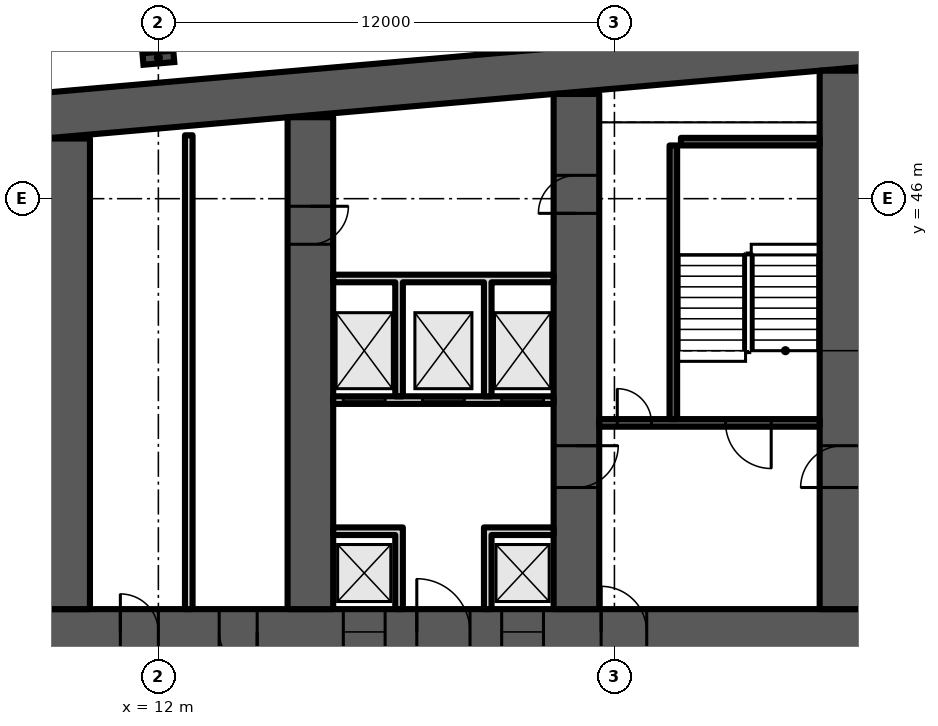
"""IFC4 building model, lengths in metres.
Left out: names, types, materials, properties, quantities, classifications, styles, units other than length and angle.
Written with IfcOpenShell. Run it as: python <this file> out.ifc"""

import sys

from ifc_helpers import new_model, si_unit, direction, frame, frame_2d, origin, origin_2d, place, context, subcontext, project, spatial, polyline, rectangle, i_section, outline, extrude, element, fill, save


model = new_model("IFC4")
c1 = context("Model", 3, precision=1e-05, world=origin(), true_north=direction((0.0, 1.0)))
c2 = subcontext(c1, "Body", "Model", "MODEL_VIEW")
j1 = project(units=[si_unit("LENGTHUNIT", "METRE"), si_unit("PLANEANGLEUNIT", "RADIAN")], contexts=[c1])
p1 = place(None, origin())
s1 = spatial("IfcSite", under=j1, at=p1, CompositionType="ELEMENT")
p2 = place(p1, origin())
s2 = spatial("IfcBuilding", under=s1, at=p2, CompositionType="ELEMENT")
p3 = place(p2, frame((0.0, 0.0, 52.3)))
s3 = spatial("IfcBuildingStorey", under=s2, at=p3, CompositionType="ELEMENT", Elevation=52.3)
p4 = place(p3, frame((0.0, 0.0, -0.0)))
e1 = element("IfcWall", 1, at=p4, inside=s3, PredefinedType="SHEAR", context=c2, shape_type="SweptSolid", body=[
    extrude(outline(polyline([(9.0, 47.583), (37.0, 50.032), (65.0, 47.583), (65.0, 48.787), (37.0, 51.237), (9.0, 48.787), (9.0, 47.583)])), origin(), (0.0, 0.0, 1.0), 3.6),
])
p5 = place(p3, frame((9.0, 34.6, 0.0), z_axis=(0.0, 0.0, 1.0), x_axis=(1.0, 0.0, 0.0)))
e2 = element("IfcWall", 2, at=p5, inside=s3, PredefinedType="SHEAR", context=c2, shape_type="SweptSolid", body=[
    extrude(rectangle(XDim=56.0, YDim=1.2, at=frame_2d((28.0, 0.0))), origin(), (0.0, 0.0, 1.0), 3.6),
])
p6 = place(p5, frame((2.0, 0.0, 0.0)))
e3 = element("IfcOpeningElement", 3, at=p6, cuts=e2, PredefinedType="OPENING", context=c2, shape_type="SweptSolid", body=[
    extrude(rectangle(XDim=1.0, YDim=2.1, at=frame_2d((0.5, 1.05))), frame((0.0, 0.61, 0.0), z_axis=(0.0, -1.0, 0.0), x_axis=(1.0, 0.0, 0.0)), (0.0, 0.0, 1.0), 1.22),
])
p7 = place(p5, frame((4.6, 0.0, 0.0)))
e4 = element("IfcOpeningElement", 4, at=p7, cuts=e2, PredefinedType="OPENING", context=c2, shape_type="SweptSolid", body=[
    extrude(rectangle(XDim=1.0, YDim=2.1, at=frame_2d((0.5, 1.05))), frame((0.0, 0.61, 0.0), z_axis=(0.0, -1.0, 0.0), x_axis=(1.0, 0.0, 0.0)), (0.0, 0.0, 1.0), 1.22),
])
p8 = place(p5, frame((7.867, 0.0, 0.0)))
e5 = element("IfcOpeningElement", 5, at=p8, cuts=e2, PredefinedType="OPENING", context=c2, shape_type="SweptSolid", body=[
    extrude(rectangle(XDim=1.1, YDim=2.1, at=frame_2d((0.55, 1.05))), frame((0.0, 0.61, 0.0), z_axis=(0.0, -1.0, 0.0), x_axis=(1.0, 0.0, 0.0)), (0.0, 0.0, 1.0), 1.22),
])
p9 = place(p5, frame((12.033, 0.0, 0.0)))
e6 = element("IfcOpeningElement", 6, at=p9, cuts=e2, PredefinedType="OPENING", context=c2, shape_type="SweptSolid", body=[
    extrude(rectangle(XDim=1.1, YDim=2.1, at=frame_2d((0.55, 1.05))), frame((0.0, 0.61, 0.0), z_axis=(0.0, -1.0, 0.0), x_axis=(1.0, 0.0, 0.0)), (0.0, 0.0, 1.0), 1.22),
])
p10 = place(p5, frame((9.8, 0.0, 0.0)))
e7 = element("IfcOpeningElement", 7, at=p10, cuts=e2, PredefinedType="OPENING", context=c2, shape_type="SweptSolid", body=[
    extrude(rectangle(XDim=1.4, YDim=2.1, at=frame_2d((0.7, 1.05))), frame((0.0, 0.61, 0.0), z_axis=(0.0, -1.0, 0.0), x_axis=(1.0, 0.0, 0.0)), (0.0, 0.0, 1.0), 1.22),
])
p11 = place(p5, frame((14.65, 0.0, 0.0)))
e8 = element("IfcOpeningElement", 8, at=p11, cuts=e2, PredefinedType="OPENING", context=c2, shape_type="SweptSolid", body=[
    extrude(rectangle(XDim=1.2, YDim=2.1, at=frame_2d((0.6, 1.05))), frame((0.0, 0.61, 0.0), z_axis=(0.0, -1.0, 0.0), x_axis=(1.0, 0.0, 0.0)), (0.0, 0.0, 1.0), 1.22),
])
p12 = place(p5, frame((21.867, 0.0, 0.0)))
e9 = element("IfcOpeningElement", 9, at=p12, cuts=e2, PredefinedType="OPENING", context=c2, shape_type="SweptSolid", body=[
    extrude(rectangle(XDim=1.1, YDim=2.1, at=frame_2d((0.55, 1.05))), frame((0.0, 0.61, 0.0), z_axis=(0.0, -1.0, 0.0), x_axis=(1.0, 0.0, 0.0)), (0.0, 0.0, 1.0), 1.22),
])
p13 = place(p5, frame((26.033, 0.0, 0.0)))
e10 = element("IfcOpeningElement", 10, at=p13, cuts=e2, PredefinedType="OPENING", context=c2, shape_type="SweptSolid", body=[
    extrude(rectangle(XDim=1.1, YDim=2.1, at=frame_2d((0.55, 1.05))), frame((0.0, 0.61, 0.0), z_axis=(0.0, -1.0, 0.0), x_axis=(1.0, 0.0, 0.0)), (0.0, 0.0, 1.0), 1.22),
])
p14 = place(p5, frame((23.8, 0.0, 0.0)))
e11 = element("IfcOpeningElement", 11, at=p14, cuts=e2, PredefinedType="OPENING", context=c2, shape_type="SweptSolid", body=[
    extrude(rectangle(XDim=1.4, YDim=2.1, at=frame_2d((0.7, 1.05))), frame((0.0, 0.61, 0.0), z_axis=(0.0, -1.0, 0.0), x_axis=(1.0, 0.0, 0.0)), (0.0, 0.0, 1.0), 1.22),
])
p15 = place(p5, frame((28.867, 0.0, 0.0)))
e12 = element("IfcOpeningElement", 12, at=p15, cuts=e2, PredefinedType="OPENING", context=c2, shape_type="SweptSolid", body=[
    extrude(rectangle(XDim=1.1, YDim=2.1, at=frame_2d((0.55, 1.05))), frame((0.0, 0.61, 0.0), z_axis=(0.0, -1.0, 0.0), x_axis=(1.0, 0.0, 0.0)), (0.0, 0.0, 1.0), 1.22),
])
p16 = place(p5, frame((33.033, 0.0, 0.0)))
e13 = element("IfcOpeningElement", 13, at=p16, cuts=e2, PredefinedType="OPENING", context=c2, shape_type="SweptSolid", body=[
    extrude(rectangle(XDim=1.1, YDim=2.1, at=frame_2d((0.55, 1.05))), frame((0.0, 0.61, 0.0), z_axis=(0.0, -1.0, 0.0), x_axis=(1.0, 0.0, 0.0)), (0.0, 0.0, 1.0), 1.22),
])
p17 = place(p5, frame((40.15, 0.0, 0.0)))
e14 = element("IfcOpeningElement", 14, at=p17, cuts=e2, PredefinedType="OPENING", context=c2, shape_type="SweptSolid", body=[
    extrude(rectangle(XDim=1.2, YDim=2.1, at=frame_2d((0.6, 1.05))), frame((0.0, 0.61, 0.0), z_axis=(0.0, -1.0, 0.0), x_axis=(1.0, 0.0, 0.0)), (0.0, 0.0, 1.0), 1.22),
])
p18 = place(p5, frame((44.8, 0.0, 0.0)))
e15 = element("IfcOpeningElement", 15, at=p18, cuts=e2, PredefinedType="OPENING", context=c2, shape_type="SweptSolid", body=[
    extrude(rectangle(XDim=1.4, YDim=2.1, at=frame_2d((0.7, 1.05))), frame((0.0, 0.61, 0.0), z_axis=(0.0, -1.0, 0.0), x_axis=(1.0, 0.0, 0.0)), (0.0, 0.0, 1.0), 1.22),
])
p19 = place(p5, frame((49.867, 0.0, 0.0)))
e16 = element("IfcOpeningElement", 16, at=p19, cuts=e2, PredefinedType="OPENING", context=c2, shape_type="SweptSolid", body=[
    extrude(rectangle(XDim=1.1, YDim=2.1, at=frame_2d((0.55, 1.05))), frame((0.0, 0.61, 0.0), z_axis=(0.0, -1.0, 0.0), x_axis=(1.0, 0.0, 0.0)), (0.0, 0.0, 1.0), 1.22),
])
p20 = place(p5, frame((53.5, 0.0, 0.0)))
e17 = element("IfcOpeningElement", 17, at=p20, cuts=e2, PredefinedType="OPENING", context=c2, shape_type="SweptSolid", body=[
    extrude(rectangle(XDim=1.1, YDim=2.1, at=frame_2d((0.55, 1.05))), frame((0.0, 0.61, 0.0), z_axis=(0.0, -1.0, 0.0), x_axis=(1.0, 0.0, 0.0)), (0.0, 0.0, 1.0), 1.22),
])
p21 = place(p5, frame((51.567, 0.0, 0.0)))
e18 = element("IfcOpeningElement", 18, at=p21, cuts=e2, PredefinedType="OPENING", context=c2, shape_type="SweptSolid", body=[
    extrude(rectangle(XDim=1.4, YDim=2.1, at=frame_2d((0.7, 1.05))), frame((0.0, 0.61, 0.0), z_axis=(0.0, -1.0, 0.0), x_axis=(1.0, 0.0, 0.0)), (0.0, 0.0, 1.0), 1.22),
])
p22 = place(p3, frame((9.6, 35.2, 0.0), z_axis=(0.0, 0.0, 1.0), x_axis=(0.0, 1.0, 0.0)))
e19 = element("IfcWall", 19, at=p22, inside=s3, PredefinedType="SHEAR", context=c2, shape_type="SweptSolid", body=[
    extrude(rectangle(XDim=12.383, YDim=1.2, at=frame_2d((6.191, 0.0))), origin(), (0.0, 0.0, 1.0), 3.6),
])
p23 = place(p3, frame((16.0, 35.2, 0.0), z_axis=(0.0, 0.0, 1.0), x_axis=(0.0, 1.0, 0.0)))
e20 = element("IfcWall", 20, at=p23, inside=s3, PredefinedType="SHEAR", context=c2, shape_type="SweptSolid", body=[
    extrude(rectangle(XDim=12.943, YDim=1.2, at=frame_2d((6.471, 0.0))), origin(), (0.0, 0.0, 1.0), 3.6),
])
p24 = place(p23, frame((9.6, 0.0, 0.0)))
e21 = element("IfcOpeningElement", 21, at=p24, cuts=e20, PredefinedType="OPENING", context=c2, shape_type="SweptSolid", body=[
    extrude(rectangle(XDim=1.0, YDim=2.1, at=frame_2d((0.5, 1.05))), frame((0.0, 0.61, 0.0), z_axis=(0.0, -1.0, 0.0), x_axis=(1.0, 0.0, 0.0)), (0.0, 0.0, 1.0), 1.22),
])
p25 = place(p3, frame((23.0, 35.2, 0.0), z_axis=(0.0, 0.0, 1.0), x_axis=(0.0, 1.0, 0.0)))
e22 = element("IfcWall", 22, at=p25, inside=s3, PredefinedType="SHEAR", context=c2, shape_type="SweptSolid", body=[
    extrude(rectangle(XDim=13.555, YDim=1.2, at=frame_2d((6.778, 0.0))), origin(), (0.0, 0.0, 1.0), 3.6),
])
p26 = place(p25, frame((10.414, 0.0, 0.0)))
e23 = element("IfcOpeningElement", 23, at=p26, cuts=e22, PredefinedType="OPENING", context=c2, shape_type="SweptSolid", body=[
    extrude(rectangle(XDim=1.0, YDim=2.1, at=frame_2d((0.5, 1.05))), frame((0.0, 0.61, 0.0), z_axis=(0.0, -1.0, 0.0), x_axis=(1.0, 0.0, 0.0)), (0.0, 0.0, 1.0), 1.22),
])
p27 = place(p25, frame((3.2, 0.0, 0.0)))
e24 = element("IfcOpeningElement", 24, at=p27, cuts=e22, PredefinedType="OPENING", context=c2, shape_type="SweptSolid", body=[
    extrude(rectangle(XDim=1.1, YDim=2.1, at=frame_2d((0.55, 1.05))), frame((0.0, 0.61, 0.0), z_axis=(0.0, -1.0, 0.0), x_axis=(1.0, 0.0, 0.0)), (0.0, 0.0, 1.0), 1.22),
])
p28 = place(p3, frame((30.0, 35.2, 0.0), z_axis=(0.0, 0.0, 1.0), x_axis=(0.0, 1.0, 0.0)))
e25 = element("IfcWall", 25, at=p28, inside=s3, PredefinedType="SHEAR", context=c2, shape_type="SweptSolid", body=[
    extrude(rectangle(XDim=14.168, YDim=1.2, at=frame_2d((7.084, 0.0))), origin(), (0.0, 0.0, 1.0), 3.6),
])
p29 = place(p28, frame((3.2, 0.0, 0.0)))
e26 = element("IfcOpeningElement", 26, at=p29, cuts=e25, PredefinedType="OPENING", context=c2, shape_type="SweptSolid", body=[
    extrude(rectangle(XDim=1.1, YDim=2.1, at=frame_2d((0.55, 1.05))), frame((0.0, 0.61, 0.0), z_axis=(0.0, -1.0, 0.0), x_axis=(1.0, 0.0, 0.0)), (0.0, 0.0, 1.0), 1.22),
])
p30 = place(p3, frame((12.0, 49.71, 0.0), z_axis=(0.0, 0.0, 1.0), x_axis=(-0.087156, 0.996197, 0.0)))
e27 = element("IfcColumn", 27, at=p30, inside=s3, PredefinedType="COLUMN", context=c2, shape_type="SweptSolid", body=[
    extrude(i_section(OverallWidth=0.303, OverallDepth=0.814, WebThickness=0.021, FlangeThickness=0.04, FilletRadius=0.03, at=origin_2d()), origin(), (0.0, 0.0, 1.0), 3.6),
])
p31 = place(p3, frame((12.8, 35.2, 0.0), z_axis=(0.0, 0.0, 1.0), x_axis=(0.0, 1.0, 0.0)))
e28 = element("IfcWall", 28, at=p31, inside=s3, PredefinedType="PARTITIONING", context=c2, shape_type="SweptSolid", body=[
    extrude(rectangle(XDim=12.468, YDim=0.2, at=frame_2d((6.234, 0.0))), origin(), (0.0, 0.0, 1.0), 3.2),
])
p32 = place(p3, frame((16.6, 40.7, 0.0), z_axis=(0.0, 0.0, 1.0), x_axis=(1.0, 0.0, 0.0)))
e29 = element("IfcWall", 29, at=p32, inside=s3, PredefinedType="PARTITIONING", context=c2, shape_type="SweptSolid", body=[
    extrude(rectangle(XDim=5.8, YDim=0.2, at=frame_2d((2.9, 0.0))), origin(), (0.0, 0.0, 1.0), 3.2),
])
p33 = place(p32, frame((0.267, 0.0, 0.0)))
e30 = element("IfcOpeningElement", 30, at=p33, cuts=e29, PredefinedType="OPENING", context=c2, shape_type="SweptSolid", body=[
    extrude(rectangle(XDim=1.1, YDim=2.1, at=frame_2d((0.55, 1.05))), frame((0.0, 0.11, 0.0), z_axis=(0.0, -1.0, 0.0), x_axis=(1.0, 0.0, 0.0)), (0.0, 0.0, 1.0), 0.22),
])
p34 = place(p32, frame((2.35, 0.0, 0.0)))
e31 = element("IfcOpeningElement", 31, at=p34, cuts=e29, PredefinedType="OPENING", context=c2, shape_type="SweptSolid", body=[
    extrude(rectangle(XDim=1.1, YDim=2.1, at=frame_2d((0.55, 1.05))), frame((0.0, 0.11, 0.0), z_axis=(0.0, -1.0, 0.0), x_axis=(1.0, 0.0, 0.0)), (0.0, 0.0, 1.0), 0.22),
])
p35 = place(p32, frame((4.433, 0.0, 0.0)))
e32 = element("IfcOpeningElement", 32, at=p35, cuts=e29, PredefinedType="OPENING", context=c2, shape_type="SweptSolid", body=[
    extrude(rectangle(XDim=1.1, YDim=2.1, at=frame_2d((0.55, 1.05))), frame((0.0, 0.11, 0.0), z_axis=(0.0, -1.0, 0.0), x_axis=(1.0, 0.0, 0.0)), (0.0, 0.0, 1.0), 0.22),
])
p36 = place(p3, frame((0.0, 0.0, -0.0)))
e33 = element("IfcWall", 33, at=p36, inside=s3, PredefinedType="PARTITIONING", context=c2, shape_type="SweptSolid", body=[
    extrude(outline(polyline([(18.233, 37.15), (16.6, 37.15), (16.6, 37.35), (18.233, 37.35), (18.433, 37.35), (18.433, 35.2), (18.233, 35.2), (18.233, 37.15)])), origin(), (0.0, 0.0, 1.0), 3.2),
])
p37 = place(p3, frame((0.0, 0.0, -0.0)))
e34 = element("IfcWall", 34, at=p37, inside=s3, PredefinedType="PARTITIONING", context=c2, shape_type="SweptSolid", body=[
    extrude(outline(polyline([(20.567, 37.35), (20.767, 37.35), (22.4, 37.35), (22.4, 37.15), (20.767, 37.15), (20.767, 35.2), (20.567, 35.2), (20.567, 37.35)])), origin(), (0.0, 0.0, 1.0), 3.2),
])
p38 = place(p3, frame((0.0, 0.0, -0.0)))
e35 = element("IfcWall", 35, at=p38, inside=s3, PredefinedType="PARTITIONING", context=c2, shape_type="SweptSolid", body=[
    extrude(outline(polyline([(18.433, 40.8), (18.233, 40.8), (18.233, 43.8), (16.6, 43.8), (16.6, 44.0), (22.4, 44.0), (22.4, 43.8), (20.767, 43.8), (20.767, 40.8), (20.567, 40.8), (20.567, 43.8), (18.433, 43.8), (18.433, 40.8)])), origin(), (0.0, 0.0, 1.0), 3.2),
])
p39 = place(p3, frame((23.6, 40.1, 0.0), z_axis=(0.0, 0.0, 1.0), x_axis=(1.0, 0.0, 0.0)))
e36 = element("IfcWall", 36, at=p39, inside=s3, PredefinedType="SHEAR", context=c2, shape_type="SweptSolid", body=[
    extrude(rectangle(XDim=5.8, YDim=0.2, at=frame_2d((2.9, 0.0))), origin(), (0.0, 0.0, 1.0), 3.2),
])
p40 = place(p39, frame((3.325, 0.0, 0.0)))
e37 = element("IfcOpeningElement", 37, at=p40, cuts=e36, PredefinedType="OPENING", context=c2, shape_type="SweptSolid", body=[
    extrude(rectangle(XDim=1.2, YDim=2.1, at=frame_2d((0.6, 1.05))), frame((0.0, 0.11, 0.0), z_axis=(0.0, -1.0, 0.0), x_axis=(1.0, 0.0, 0.0)), (0.0, 0.0, 1.0), 0.22),
])
p41 = place(p39, frame((0.475, 0.0, 0.0)))
e38 = element("IfcOpeningElement", 38, at=p41, cuts=e36, PredefinedType="OPENING", context=c2, shape_type="SweptSolid", body=[
    extrude(rectangle(XDim=0.9, YDim=2.1, at=frame_2d((0.45, 1.05))), frame((0.0, 0.11, 0.0), z_axis=(0.0, -1.0, 0.0), x_axis=(1.0, 0.0, 0.0)), (0.0, 0.0, 1.0), 0.22),
])
p42 = place(p3, frame((25.55, 40.2, 0.0), z_axis=(0.0, 0.0, 1.0), x_axis=(0.0, 1.0, 0.0)))
e39 = element("IfcWall", 39, at=p42, inside=s3, PredefinedType="SHEAR", context=c2, shape_type="SweptSolid", body=[
    extrude(rectangle(XDim=7.2, YDim=0.2, at=frame_2d((3.6, 0.0))), origin(), (0.0, 0.0, 1.0), 3.2),
])
p43 = place(p3, frame((25.75, 47.5, 0.0), z_axis=(0.0, 0.0, 1.0), x_axis=(1.0, 0.0, 0.0)))
e40 = element("IfcWall", 40, at=p43, inside=s3, PredefinedType="SHEAR", context=c2, shape_type="SweptSolid", body=[
    extrude(rectangle(XDim=3.65, YDim=0.2, at=frame_2d((1.825, 0.0))), origin(), (0.0, 0.0, 1.0), 3.2),
])
p44 = place(p6, origin())
e41 = element("IfcDoor", 41, at=p44, inside=s3, OperationType="SINGLE_SWING_LEFT", PredefinedType="DOOR", context=c2, shape_type="SweptSolid", body=[
    extrude(rectangle(XDim=1.0, YDim=2.1, at=frame_2d((0.5, 1.05))), frame((0.0, 0.6, 0.0), z_axis=(0.0, -1.0, 0.0), x_axis=(1.0, 0.0, 0.0)), (0.0, 0.0, 1.0), 1.199),
])
fill(e3, e41)
p45 = place(p7, origin())
e42 = element("IfcDoor", 42, at=p45, inside=s3, OperationType="SINGLE_SWING_RIGHT", PredefinedType="DOOR", context=c2, shape_type="SweptSolid", body=[
    extrude(rectangle(XDim=1.0, YDim=2.1, at=frame_2d((0.5, 1.05))), frame((0.0, 0.6, 0.0), z_axis=(0.0, -1.0, 0.0), x_axis=(1.0, 0.0, 0.0)), (0.0, 0.0, 1.0), 1.199),
])
fill(e4, e42)
p46 = place(p8, origin())
e43 = element("IfcDoor", 43, at=p46, inside=s3, OperationType="DOUBLE_DOOR_SLIDING", PredefinedType="DOOR", context=c2, shape_type="SweptSolid", body=[
    extrude(rectangle(XDim=1.1, YDim=2.1, at=frame_2d((0.55, 1.05))), frame((0.0, 0.025, 0.0), z_axis=(0.0, -1.0, 0.0), x_axis=(1.0, 0.0, 0.0)), (0.0, 0.0, 1.0), 0.05),
])
fill(e5, e43)
p47 = place(p9, origin())
e44 = element("IfcDoor", 44, at=p47, inside=s3, OperationType="DOUBLE_DOOR_SLIDING", PredefinedType="DOOR", context=c2, shape_type="SweptSolid", body=[
    extrude(rectangle(XDim=1.1, YDim=2.1, at=frame_2d((0.55, 1.05))), frame((0.0, 0.025, 0.0), z_axis=(0.0, -1.0, 0.0), x_axis=(1.0, 0.0, 0.0)), (0.0, 0.0, 1.0), 0.05),
])
fill(e6, e44)
p48 = place(p10, origin())
e45 = element("IfcDoor", 45, at=p48, inside=s3, OperationType="DOUBLE_DOOR_SINGLE_SWING", PredefinedType="DOOR", context=c2, shape_type="SweptSolid", body=[
    extrude(rectangle(XDim=1.4, YDim=2.1, at=frame_2d((0.7, 1.05))), frame((0.0, 0.025, 0.0), z_axis=(0.0, -1.0, 0.0), x_axis=(1.0, 0.0, 0.0)), (0.0, 0.0, 1.0), 0.05),
])
fill(e7, e45)
p49 = place(p33, origin())
e46 = element("IfcDoor", 46, at=p49, inside=s3, OperationType="DOUBLE_DOOR_SLIDING", PredefinedType="DOOR", context=c2, shape_type="SweptSolid", body=[
    extrude(rectangle(XDim=1.1, YDim=2.1, at=frame_2d((0.55, 1.05))), frame((0.0, 0.025, 0.0), z_axis=(0.0, -1.0, 0.0), x_axis=(1.0, 0.0, 0.0)), (0.0, 0.0, 1.0), 0.05),
])
fill(e30, e46)
p50 = place(p34, origin())
e47 = element("IfcDoor", 47, at=p50, inside=s3, OperationType="DOUBLE_DOOR_SLIDING", PredefinedType="DOOR", context=c2, shape_type="SweptSolid", body=[
    extrude(rectangle(XDim=1.1, YDim=2.1, at=frame_2d((0.55, 1.05))), frame((0.0, 0.025, 0.0), z_axis=(0.0, -1.0, 0.0), x_axis=(1.0, 0.0, 0.0)), (0.0, 0.0, 1.0), 0.05),
])
fill(e31, e47)
p51 = place(p35, origin())
e48 = element("IfcDoor", 48, at=p51, inside=s3, OperationType="DOUBLE_DOOR_SLIDING", PredefinedType="DOOR", context=c2, shape_type="SweptSolid", body=[
    extrude(rectangle(XDim=1.1, YDim=2.1, at=frame_2d((0.55, 1.05))), frame((0.0, 0.025, 0.0), z_axis=(0.0, -1.0, 0.0), x_axis=(1.0, 0.0, 0.0)), (0.0, 0.0, 1.0), 0.05),
])
fill(e32, e48)
p52 = place(p26, origin())
e49 = element("IfcDoor", 49, at=p52, inside=s3, OperationType="SINGLE_SWING_LEFT", PredefinedType="DOOR", context=c2, shape_type="SweptSolid", body=[
    extrude(rectangle(XDim=1.0, YDim=2.1, at=frame_2d((0.5, 1.05))), frame((0.0, 0.6, 0.0), z_axis=(0.0, -1.0, 0.0), x_axis=(1.0, 0.0, 0.0)), (0.0, 0.0, 1.0), 1.199),
])
fill(e23, e49)
p53 = place(p40, origin())
e50 = element("IfcDoor", 50, at=p53, inside=s3, OperationType="SINGLE_SWING_RIGHT", PredefinedType="DOOR", context=c2, shape_type="SweptSolid", body=[
    extrude(rectangle(XDim=1.2, YDim=2.1, at=frame_2d((0.6, 1.05))), frame((0.0, 0.025, 0.0), z_axis=(0.0, -1.0, 0.0), x_axis=(1.0, 0.0, 0.0)), (0.0, 0.0, 1.0), 0.05),
])
fill(e37, e50)
p54 = place(p41, origin())
e51 = element("IfcDoor", 51, at=p54, inside=s3, OperationType="SINGLE_SWING_LEFT", PredefinedType="DOOR", context=c2, shape_type="SweptSolid", body=[
    extrude(rectangle(XDim=0.9, YDim=2.1, at=frame_2d((0.45, 1.05))), frame((0.0, 0.025, 0.0), z_axis=(0.0, -1.0, 0.0), x_axis=(1.0, 0.0, 0.0)), (0.0, 0.0, 1.0), 0.05),
])
fill(e38, e51)
p55 = place(p11, origin())
e52 = element("IfcDoor", 52, at=p55, inside=s3, OperationType="SINGLE_SWING_LEFT", PredefinedType="DOOR", context=c2, shape_type="SweptSolid", body=[
    extrude(rectangle(XDim=1.2, YDim=2.1, at=frame_2d((0.6, 1.05))), frame((0.0, 0.025, 0.0), z_axis=(0.0, -1.0, 0.0), x_axis=(1.0, 0.0, 0.0)), (0.0, 0.0, 1.0), 0.05),
])
fill(e8, e52)
p56 = place(p24, origin())
e53 = element("IfcDoor", 53, at=p56, inside=s3, OperationType="SINGLE_SWING_RIGHT", PredefinedType="DOOR", context=c2, shape_type="SweptSolid", body=[
    extrude(rectangle(XDim=1.0, YDim=2.1, at=frame_2d((0.5, 1.05))), frame((0.0, 0.6, 0.0), z_axis=(0.0, -1.0, 0.0), x_axis=(1.0, 0.0, 0.0)), (0.0, 0.0, 1.0), 1.199),
])
fill(e21, e53)
p57 = place(p27, origin())
e54 = element("IfcDoor", 54, at=p57, inside=s3, OperationType="SINGLE_SWING_RIGHT", PredefinedType="DOOR", context=c2, shape_type="SweptSolid", body=[
    extrude(rectangle(XDim=1.1, YDim=2.1, at=frame_2d((0.55, 1.05))), frame((0.0, 0.025, 0.0), z_axis=(0.0, -1.0, 0.0), x_axis=(1.0, 0.0, 0.0)), (0.0, 0.0, 1.0), 0.05),
])
fill(e24, e54)
p58 = place(p29, origin())
e55 = element("IfcDoor", 55, at=p58, inside=s3, OperationType="SINGLE_SWING_LEFT", PredefinedType="DOOR", context=c2, shape_type="SweptSolid", body=[
    extrude(rectangle(XDim=1.1, YDim=2.1, at=frame_2d((0.55, 1.05))), frame((0.0, 0.025, 0.0), z_axis=(0.0, -1.0, 0.0), x_axis=(1.0, 0.0, 0.0)), (0.0, 0.0, 1.0), 0.05),
])
fill(e26, e55)
save(model, sys.argv[1])
